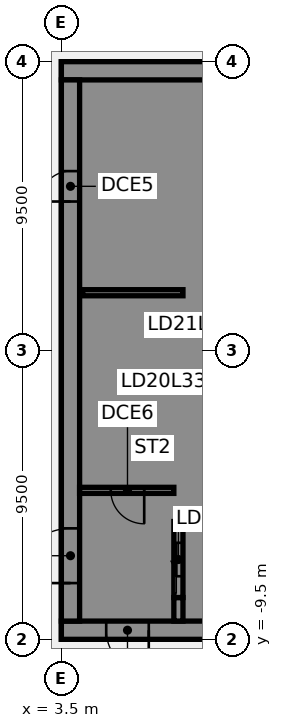
"""IFC4 building model, lengths in metres.
Left out: names, types, materials, properties, quantities, classifications, styles, units other than length and angle.
Written with IfcOpenShell. Run it as: python <this file> out.ifc"""

import sys

from ifc_helpers import new_model, si_unit, direction, frame, frame_2d, origin, place, context, subcontext, project, spatial, polyline, rectangle, outline, extrude, element, fill, save


model = new_model("IFC4")
c1 = context("Model", 3, precision=1e-05, world=origin(), true_north=direction((0.0, 1.0)))
c2 = subcontext(c1, "Body", "Model", "MODEL_VIEW")
j1 = project(units=[si_unit("LENGTHUNIT", "METRE"), si_unit("PLANEANGLEUNIT", "RADIAN")], contexts=[c1])
p1 = place(None, origin())
s1 = spatial("IfcSite", under=j1, at=p1, CompositionType="ELEMENT")
p2 = place(p1, origin())
s2 = spatial("IfcBuilding", under=s1, at=p2, CompositionType="ELEMENT")
p3 = place(p2, frame((0.0, 0.0, 136.75)))
s3 = spatial("IfcBuildingStorey", under=s2, at=p3, CompositionType="ELEMENT", Elevation=136.75)
p4 = place(p3, frame((16.5, -9.2, 0.0), z_axis=(0.0, 0.0, 1.0), x_axis=(-1.0, 0.0, 0.0)))
e1 = element("IfcWall", 1, at=p4, inside=s3, PredefinedType="SHEAR", context=c2, shape_type="SweptSolid", body=[
    extrude(rectangle(XDim=13.0, YDim=0.6, at=frame_2d((6.5, 0.0))), origin(), (0.0, 0.0, 1.0), 3.61),
])
p5 = place(p4, frame((4.15, 0.0, 0.0)))
e2 = element("IfcOpeningElement", 2, at=p5, cuts=e1, PredefinedType="OPENING", context=c2, shape_type="SweptSolid", body=[
    extrude(rectangle(XDim=1.4, YDim=2.1, at=frame_2d((0.7, 1.05))), frame((0.0, 0.31, 0.0), z_axis=(0.0, -1.0, 0.0), x_axis=(1.0, 0.0, 0.0)), (0.0, 0.0, 1.0), 0.62),
])
p6 = place(p4, frame((10.125, 0.0, 0.0)))
e3 = element("IfcOpeningElement", 3, at=p6, cuts=e1, PredefinedType="OPENING", context=c2, shape_type="SweptSolid", body=[
    extrude(rectangle(XDim=1.4, YDim=2.1, at=frame_2d((0.7, 1.05))), frame((0.0, 0.31, 0.0), z_axis=(0.0, -1.0, 0.0), x_axis=(1.0, 0.0, 0.0)), (0.0, 0.0, 1.0), 0.62),
])
p7 = place(p3, frame((16.5, 9.2, 0.0), z_axis=(0.0, 0.0, 1.0), x_axis=(-1.0, 0.0, 0.0)))
e4 = element("IfcWall", 4, at=p7, inside=s3, PredefinedType="SHEAR", context=c2, shape_type="SweptSolid", body=[
    extrude(rectangle(XDim=13.0, YDim=0.6, at=frame_2d((6.5, 0.0))), origin(), (0.0, 0.0, 1.0), 3.61),
])
p8 = place(p3, origin())
e5 = element("IfcWall", 5, at=p8, inside=s3, PredefinedType="SHEAR", context=c2, shape_type="SweptSolid", body=[
    extrude(outline(polyline([(9.8, -5.375), (7.5, -5.375), (7.5, -2.875), (9.8, -2.875), (9.8, -2.625), (7.5, -2.625), (7.5, -0.125), (9.8, -0.125), (9.8, 0.125), (7.5, 0.125), (7.5, 2.625), (9.8, 2.625), (9.8, 2.875), (7.5, 2.875), (7.5, 5.375), (9.8, 5.375), (9.8, 5.625), (7.5, 5.625), (7.5, 8.125), (9.8, 8.125), (9.8, 8.9), (7.5, 8.9), (7.2, 8.9), (7.2, -5.625), (7.5, -5.625), (9.8, -5.625), (9.8, -5.375)])), origin(), (0.0, 0.0, 1.0), 3.61),
])
p9 = place(p3, origin())
e6 = element("IfcWall", 6, at=p9, inside=s3, PredefinedType="SHEAR", context=c2, shape_type="SweptSolid", body=[
    extrude(outline(polyline([(7.5, -8.125), (7.5, -8.9), (9.8, -8.9), (9.8, -8.125), (9.8, -5.625), (9.55, -5.625), (9.55, -8.125), (7.5, -8.125)])), origin(), (0.0, 0.0, 1.0), 3.61),
])
p10 = place(p3, frame((7.35, -8.9, 0.0), z_axis=(0.0, 0.0, 1.0), x_axis=(0.0, 1.0, 0.0)))
e7 = element("IfcWall", 7, at=p10, inside=s3, PredefinedType="SHEAR", context=c2, shape_type="SweptSolid", body=[
    extrude(rectangle(XDim=0.775, YDim=0.3, at=frame_2d((0.387, 0.0))), origin(), (0.0, 0.0, 1.0), 3.61),
])
p11 = place(p3, frame((7.5, 1.9, 0.0), z_axis=(0.0, 0.0, 1.0), x_axis=(-1.0, 0.0, 0.0)))
e8 = element("IfcWall", 8, at=p11, inside=s3, PredefinedType="SHEAR", context=c2, shape_type="SweptSolid", body=[
    extrude(rectangle(XDim=3.3, YDim=0.2, at=frame_2d((1.65, 0.0))), origin(), (0.0, 0.0, 1.0), 3.61),
])
p12 = place(p3, frame((7.35, -8.125, 0.0), z_axis=(0.0, 0.0, 1.0), x_axis=(0.0, 1.0, 0.0)))
e9 = element("IfcWall", 9, at=p12, inside=s3, PredefinedType="SHEAR", context=c2, shape_type="SweptSolid", body=[
    extrude(rectangle(XDim=2.5, YDim=0.3, at=frame_2d((1.25, 0.0))), origin(), (0.0, 0.0, 1.0), 3.61),
])
p13 = place(p12, frame((0.7, 0.0, 0.0)))
e10 = element("IfcOpeningElement", 10, at=p13, cuts=e9, PredefinedType="OPENING", context=c2, shape_type="SweptSolid", body=[
    extrude(rectangle(XDim=1.1, YDim=2.1, at=frame_2d((0.55, 1.05))), frame((0.0, 0.16, 0.0), z_axis=(0.0, -1.0, 0.0), x_axis=(1.0, 0.0, 0.0)), (0.0, 0.0, 1.0), 0.32),
])
p14 = place(p3, frame((3.8, -8.9, 0.0), z_axis=(0.0, 0.0, 1.0), x_axis=(0.0, 1.0, 0.0)))
e11 = element("IfcWall", 11, at=p14, inside=s3, PredefinedType="SHEAR", context=c2, shape_type="SweptSolid", body=[
    extrude(rectangle(XDim=17.8, YDim=0.6, at=frame_2d((8.9, 0.0))), origin(), (0.0, 0.0, 1.0), 3.61),
])
p15 = place(p14, frame((1.25, 0.0, 0.0)))
e12 = element("IfcOpeningElement", 12, at=p15, cuts=e11, PredefinedType="OPENING", context=c2, shape_type="SweptSolid", body=[
    extrude(rectangle(XDim=1.8, YDim=2.1, at=frame_2d((0.9, 1.05))), frame((0.0, 0.31, 0.0), z_axis=(0.0, -1.0, 0.0), x_axis=(1.0, 0.0, 0.0)), (0.0, 0.0, 1.0), 0.62),
])
p16 = place(p14, frame((13.8, 0.0, 0.0)))
e13 = element("IfcOpeningElement", 13, at=p16, cuts=e11, PredefinedType="OPENING", context=c2, shape_type="SweptSolid", body=[
    extrude(rectangle(XDim=1.0, YDim=2.1, at=frame_2d((0.5, 1.05))), frame((0.0, 0.31, 0.0), z_axis=(0.0, -1.0, 0.0), x_axis=(1.0, 0.0, 0.0)), (0.0, 0.0, 1.0), 0.62),
])
p17 = place(p3, frame((7.2, -4.6, 0.0), z_axis=(0.0, 0.0, 1.0), x_axis=(-1.0, 0.0, 0.0)))
e14 = element("IfcWall", 14, at=p17, inside=s3, PredefinedType="SHEAR", context=c2, shape_type="SweptSolid", body=[
    extrude(rectangle(XDim=3.1, YDim=0.2, at=frame_2d((1.55, 0.0))), origin(), (0.0, 0.0, 1.0), 3.61),
])
p18 = place(p17, frame((0.975, 0.0, 0.0)))
e15 = element("IfcOpeningElement", 15, at=p18, cuts=e14, PredefinedType="OPENING", context=c2, shape_type="SweptSolid", body=[
    extrude(rectangle(XDim=1.1, YDim=2.1, at=frame_2d((0.55, 1.05))), frame((0.0, 0.11, 0.0), z_axis=(0.0, -1.0, 0.0), x_axis=(1.0, 0.0, 0.0)), (0.0, 0.0, 1.0), 0.22),
])
p19 = place(p6, origin())
e16 = element("IfcDoor", 16, at=p19, inside=s3, OperationType="SINGLE_SWING_LEFT", PredefinedType="DOOR", context=c2, shape_type="SweptSolid", body=[
    extrude(rectangle(XDim=1.4, YDim=2.1, at=frame_2d((0.7, 1.05))), frame((0.0, 0.025, 0.0), z_axis=(0.0, -1.0, 0.0), x_axis=(1.0, 0.0, 0.0)), (0.0, 0.0, 1.0), 0.05),
])
fill(e3, e16)
p20 = place(p15, origin())
e17 = element("IfcDoor", 17, at=p20, inside=s3, OperationType="SINGLE_SWING_LEFT", PredefinedType="DOOR", context=c2, shape_type="SweptSolid", body=[
    extrude(rectangle(XDim=1.8, YDim=2.1, at=frame_2d((0.9, 1.05))), frame((0.0, 0.025, 0.0), z_axis=(0.0, -1.0, 0.0), x_axis=(1.0, 0.0, 0.0)), (0.0, 0.0, 1.0), 0.05),
])
fill(e12, e17)
p21 = place(p16, origin())
e18 = element("IfcDoor", 18, at=p21, inside=s3, OperationType="SINGLE_SWING_LEFT", PredefinedType="DOOR", context=c2, shape_type="SweptSolid", body=[
    extrude(rectangle(XDim=1.0, YDim=2.1, at=frame_2d((0.5, 1.05))), frame((0.0, 0.025, 0.0), z_axis=(0.0, -1.0, 0.0), x_axis=(1.0, 0.0, 0.0)), (0.0, 0.0, 1.0), 0.05),
])
fill(e13, e18)
p22 = place(p18, origin())
e19 = element("IfcDoor", 19, at=p22, inside=s3, OperationType="SINGLE_SWING_LEFT", PredefinedType="DOOR", context=c2, shape_type="SweptSolid", body=[
    extrude(rectangle(XDim=1.1, YDim=2.1, at=frame_2d((0.55, 1.05))), frame((0.0, 0.025, 0.0), z_axis=(0.0, -1.0, 0.0), x_axis=(1.0, 0.0, 0.0)), (0.0, 0.0, 1.0), 0.05),
])
fill(e15, e19)
p23 = place(p13, origin())
e20 = element("IfcDoor", 20, at=p23, inside=s3, OperationType="SLIDING_TO_LEFT", PredefinedType="DOOR", context=c2, shape_type="SweptSolid", body=[
    extrude(rectangle(XDim=1.1, YDim=2.1, at=frame_2d((0.55, 1.05))), frame((0.0, 0.025, 0.0), z_axis=(0.0, -1.0, 0.0), x_axis=(1.0, 0.0, 0.0)), (0.0, 0.0, 1.0), 0.05),
])
fill(e10, e20)
save(model, sys.argv[1])
